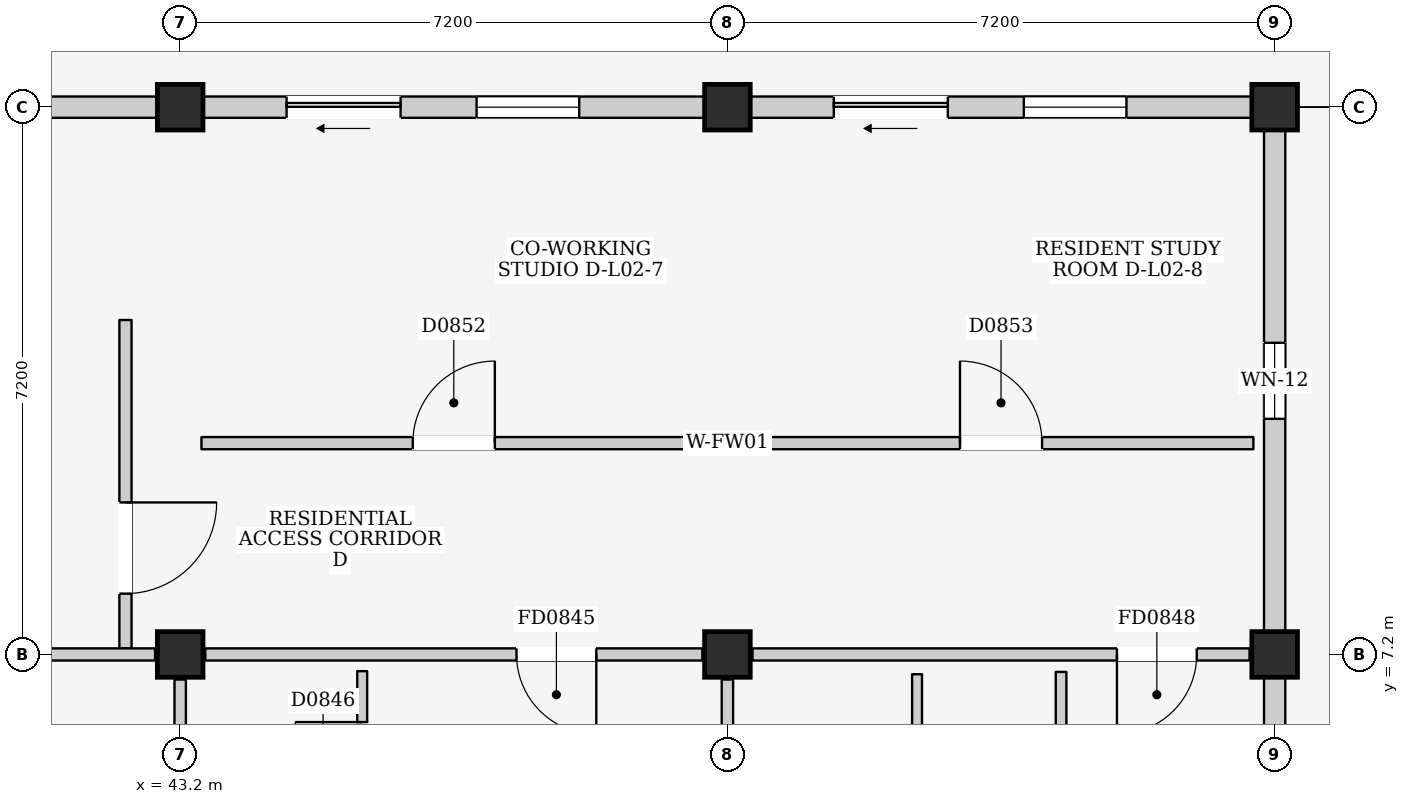
"""IFC4 building model, lengths in metres.
Left out: names, types, materials, properties, quantities, classifications, styles, units other than length and angle.
Written with IfcOpenShell. Run it as: python <this file> out.ifc"""

import sys

from ifc_helpers import new_model, si_unit, direction, frame, frame_2d, origin, origin_2d, place, context, subcontext, project, spatial, rectangle, extrude, element, fill, save


model = new_model("IFC4")
c1 = context("Model", 3, precision=1e-05, world=origin(), true_north=direction((0.0, 1.0)))
c2 = subcontext(c1, "Body", "Model", "MODEL_VIEW")
j1 = project(units=[si_unit("LENGTHUNIT", "METRE"), si_unit("PLANEANGLEUNIT", "RADIAN")], contexts=[c1])
p1 = place(None, origin())
s1 = spatial("IfcSite", under=j1, at=p1, CompositionType="ELEMENT")
p2 = place(p1, origin())
s2 = spatial("IfcBuilding", under=s1, at=p2, CompositionType="ELEMENT")
p3 = place(p2, frame((0.0, 0.0, 9.0)))
s3 = spatial("IfcBuildingStorey", under=s2, at=p3, CompositionType="ELEMENT", Elevation=9.0)
for number, where, z_axis, x_axis in (
    (1, (43.2, 7.2, 0.0), (0.0, 0.0, 1.0), (1.0, 0.0, 0.0)),
    (2, (43.2, 14.4, 0.0), (0.0, 0.0, 1.0), (1.0, 0.0, 0.0)),
    (3, (50.4, 7.2, 0.0), (0.0, 0.0, 1.0), (1.0, 0.0, 0.0)),
    (4, (50.4, 14.4, 0.0), (0.0, 0.0, 1.0), (1.0, 0.0, 0.0)),
    (5, (57.6, 7.2, 0.0), (0.0, 0.0, 1.0), (1.0, 0.0, 0.0)),
    (6, (57.6, 14.4, 0.0), (0.0, 0.0, 1.0), (1.0, 0.0, 0.0)),
):
    element("IfcColumn", number, at=place(p3, frame(where, z_axis=z_axis, x_axis=x_axis)), inside=s3, PredefinedType="COLUMN", context=c2, shape_type="SweptSolid", body=[
        extrude(rectangle(XDim=0.6, YDim=0.6, at=origin_2d()), origin(), (0.0, 0.0, 1.0), 3.2),
    ])
p4 = place(p3, frame((36.3, 14.4, 0.0), z_axis=(0.0, 0.0, 1.0), x_axis=(1.0, 0.0, 0.0)))
e7 = element("IfcWall", 7, at=p4, inside=s3, PredefinedType="ELEMENTEDWALL", context=c2, shape_type="SweptSolid", body=[
    extrude(rectangle(XDim=6.6, YDim=0.28, at=frame_2d((3.3, 0.0))), origin(), (0.0, 0.0, 1.0), 2.345),
])
p5 = place(p4, frame((2.8, 0.0, 1.2)))
e8 = element("IfcOpeningElement", 8, at=p5, cuts=e7, PredefinedType="OPENING", context=c2, shape_type="SweptSolid", body=[
    extrude(rectangle(XDim=1.0, YDim=0.9, at=frame_2d((0.5, 0.45))), frame((0.0, 0.155, 0.0), z_axis=(0.0, -1.0, 0.0), x_axis=(1.0, 0.0, 0.0)), (0.0, 0.0, 1.0), 0.31),
])
p6 = place(p3, frame((43.5, 14.4, 0.0), z_axis=(0.0, 0.0, 1.0), x_axis=(1.0, 0.0, 0.0)))
e9 = element("IfcWall", 9, at=p6, inside=s3, PredefinedType="ELEMENTEDWALL", context=c2, shape_type="SweptSolid", body=[
    extrude(rectangle(XDim=6.6, YDim=0.28, at=frame_2d((3.3, 0.0))), origin(), (0.0, 0.0, 1.0), 2.345),
])
p7 = place(p6, frame((1.1, 0.0, 0.0)))
e10 = element("IfcOpeningElement", 10, at=p7, cuts=e9, PredefinedType="OPENING", context=c2, shape_type="SweptSolid", body=[
    extrude(rectangle(XDim=1.5, YDim=2.12, at=frame_2d((0.75, 1.06))), frame((0.0, 0.155, 0.0), z_axis=(0.0, -1.0, 0.0), x_axis=(1.0, 0.0, 0.0)), (0.0, 0.0, 1.0), 0.31),
])
p8 = place(p6, frame((3.6, 0.0, 0.735)))
e11 = element("IfcOpeningElement", 11, at=p8, cuts=e9, PredefinedType="OPENING", context=c2, shape_type="SweptSolid", body=[
    extrude(rectangle(XDim=1.35, YDim=1.5, at=frame_2d((0.675, 0.75))), frame((0.0, 0.155, 0.0), z_axis=(0.0, -1.0, 0.0), x_axis=(1.0, 0.0, 0.0)), (0.0, 0.0, 1.0), 0.31),
])
p9 = place(p3, frame((57.6, 0.3, 0.0), z_axis=(0.0, 0.0, 1.0), x_axis=(0.0, 1.0, 0.0)))
e12 = element("IfcWall", 12, at=p9, inside=s3, PredefinedType="ELEMENTEDWALL", context=c2, shape_type="SweptSolid", body=[
    extrude(rectangle(XDim=6.6, YDim=0.28, at=frame_2d((3.3, 0.0))), origin(), (0.0, 0.0, 1.0), 2.395),
])
p10 = place(p9, frame((1.4, 0.0, 0.0)))
e13 = element("IfcOpeningElement", 13, at=p10, cuts=e12, PredefinedType="OPENING", context=c2, shape_type="SweptSolid", body=[
    extrude(rectangle(XDim=1.4, YDim=2.1, at=frame_2d((0.7, 1.05))), frame((0.0, 0.155, 0.0), z_axis=(0.0, -1.0, 0.0), x_axis=(1.0, 0.0, 0.0)), (0.0, 0.0, 1.0), 0.31),
])
p11 = place(p9, frame((4.4, 0.0, 0.935)))
e14 = element("IfcOpeningElement", 14, at=p11, cuts=e12, PredefinedType="OPENING", context=c2, shape_type="SweptSolid", body=[
    extrude(rectangle(XDim=1.2, YDim=1.35, at=frame_2d((0.6, 0.675))), frame((0.0, 0.155, 0.0), z_axis=(0.0, -1.0, 0.0), x_axis=(1.0, 0.0, 0.0)), (0.0, 0.0, 1.0), 0.31),
])
p12 = place(p3, frame((50.7, 14.4, 0.0), z_axis=(0.0, 0.0, 1.0), x_axis=(1.0, 0.0, 0.0)))
e15 = element("IfcWall", 15, at=p12, inside=s3, PredefinedType="ELEMENTEDWALL", context=c2, shape_type="SweptSolid", body=[
    extrude(rectangle(XDim=6.6, YDim=0.28, at=frame_2d((3.3, 0.0))), origin(), (0.0, 0.0, 1.0), 2.345),
])
p13 = place(p12, frame((1.1, 0.0, 0.0)))
e16 = element("IfcOpeningElement", 16, at=p13, cuts=e15, PredefinedType="OPENING", context=c2, shape_type="SweptSolid", body=[
    extrude(rectangle(XDim=1.5, YDim=2.12, at=frame_2d((0.75, 1.06))), frame((0.0, 0.155, 0.0), z_axis=(0.0, -1.0, 0.0), x_axis=(1.0, 0.0, 0.0)), (0.0, 0.0, 1.0), 0.31),
])
p14 = place(p12, frame((3.6, 0.0, 0.735)))
e17 = element("IfcOpeningElement", 17, at=p14, cuts=e15, PredefinedType="OPENING", context=c2, shape_type="SweptSolid", body=[
    extrude(rectangle(XDim=1.35, YDim=1.5, at=frame_2d((0.675, 0.75))), frame((0.0, 0.155, 0.0), z_axis=(0.0, -1.0, 0.0), x_axis=(1.0, 0.0, 0.0)), (0.0, 0.0, 1.0), 0.31),
])
p15 = place(p3, frame((57.6, 7.5, 0.0), z_axis=(0.0, 0.0, 1.0), x_axis=(0.0, 1.0, 0.0)))
e18 = element("IfcWall", 18, at=p15, inside=s3, PredefinedType="ELEMENTEDWALL", context=c2, shape_type="SweptSolid", body=[
    extrude(rectangle(XDim=6.6, YDim=0.28, at=frame_2d((3.3, 0.0))), origin(), (0.0, 0.0, 1.0), 2.395),
])
p16 = place(p15, frame((2.8, 0.0, 1.1)))
e19 = element("IfcOpeningElement", 19, at=p16, cuts=e18, PredefinedType="OPENING", context=c2, shape_type="SweptSolid", body=[
    extrude(rectangle(XDim=1.0, YDim=0.9, at=frame_2d((0.5, 0.45))), frame((0.0, 0.155, 0.0), z_axis=(0.0, -1.0, 0.0), x_axis=(1.0, 0.0, 0.0)), (0.0, 0.0, 1.0), 0.31),
])
p17 = place(p3, frame((42.48, 7.28, 0.0), z_axis=(0.0, 0.0, 1.0), x_axis=(0.0, 1.0, 0.0)))
e20 = element("IfcWall", 20, at=p17, inside=s3, PredefinedType="PARTITIONING", context=c2, shape_type="SweptSolid", body=[
    extrude(rectangle(XDim=4.32, YDim=0.16, at=frame_2d((2.16, 0.0))), origin(), (0.0, 0.0, 1.0), 2.96),
])
p18 = place(p17, frame((0.72, 0.0, 0.0)))
e21 = element("IfcOpeningElement", 21, at=p18, cuts=e20, PredefinedType="OPENING", context=c2, shape_type="SweptSolid", body=[
    extrude(rectangle(XDim=1.2, YDim=2.2, at=frame_2d((0.6, 1.1))), frame((0.0, 0.095, 0.0), z_axis=(0.0, -1.0, 0.0), x_axis=(1.0, 0.0, 0.0)), (0.0, 0.0, 1.0), 0.19),
])
p19 = place(p3, frame((36.33, 7.2, 0.0), z_axis=(0.0, 0.0, 1.0), x_axis=(1.0, 0.0, 0.0)))
e22 = element("IfcWall", 22, at=p19, inside=s3, PredefinedType="PARTITIONING", context=c2, shape_type="SweptSolid", body=[
    extrude(rectangle(XDim=6.54, YDim=0.16, at=frame_2d((3.27, 0.0))), origin(), (0.0, 0.0, 1.0), 2.345),
])
p20 = place(p3, frame((43.2, 0.33, 0.0), z_axis=(0.0, 0.0, 1.0), x_axis=(0.0, 1.0, 0.0)))
e23 = element("IfcWall", 23, at=p20, inside=s3, PredefinedType="PARTITIONING", context=c2, shape_type="SweptSolid", body=[
    extrude(rectangle(XDim=6.54, YDim=0.15, at=frame_2d((3.27, 0.0))), origin(), (0.0, 0.0, 1.0), 2.395),
])
p21 = place(p3, frame((43.53, 7.2, 0.0), z_axis=(0.0, 0.0, 1.0), x_axis=(1.0, 0.0, 0.0)))
e24 = element("IfcWall", 24, at=p21, inside=s3, PredefinedType="PARTITIONING", context=c2, shape_type="SweptSolid", body=[
    extrude(rectangle(XDim=6.54, YDim=0.16, at=frame_2d((3.27, 0.0))), origin(), (0.0, 0.0, 1.0), 2.345),
])
p22 = place(p21, frame((4.095, 0.0, 0.0)))
e25 = element("IfcOpeningElement", 25, at=p22, cuts=e24, PredefinedType="OPENING", context=c2, shape_type="SweptSolid", body=[
    extrude(rectangle(XDim=1.05, YDim=2.15, at=frame_2d((0.525, 1.075))), frame((0.0, 0.095, 0.0), z_axis=(0.0, -1.0, 0.0), x_axis=(1.0, 0.0, 0.0)), (0.0, 0.0, 1.0), 0.19),
])
p23 = place(p3, frame((50.4, 0.33, 0.0), z_axis=(0.0, 0.0, 1.0), x_axis=(0.0, 1.0, 0.0)))
e26 = element("IfcWall", 26, at=p23, inside=s3, PredefinedType="PARTITIONING", context=c2, shape_type="SweptSolid", body=[
    extrude(rectangle(XDim=6.54, YDim=0.15, at=frame_2d((3.27, 0.0))), origin(), (0.0, 0.0, 1.0), 2.395),
])
p24 = place(p3, frame((45.595, 4.76, 0.0), z_axis=(0.0, 0.0, 1.0), x_axis=(0.0, 1.0, 0.0)))
e27 = element("IfcWall", 27, at=p24, inside=s3, PredefinedType="PARTITIONING", context=c2, shape_type="SweptSolid", body=[
    extrude(rectangle(XDim=2.22, YDim=0.13, at=frame_2d((1.11, 0.0))), origin(), (0.0, 0.0, 1.0), 2.96),
])
p25 = place(p24, frame((0.67, 0.0, 0.0)))
e28 = element("IfcOpeningElement", 28, at=p25, cuts=e27, PredefinedType="OPENING", context=c2, shape_type="SweptSolid", body=[
    extrude(rectangle(XDim=0.88, YDim=2.1, at=frame_2d((0.44, 1.05))), frame((0.0, 0.08, 0.0), z_axis=(0.0, -1.0, 0.0), x_axis=(1.0, 0.0, 0.0)), (0.0, 0.0, 1.0), 0.16),
])
p26 = place(p3, frame((50.73, 7.2, 0.0), z_axis=(0.0, 0.0, 1.0), x_axis=(1.0, 0.0, 0.0)))
e29 = element("IfcWall", 29, at=p26, inside=s3, PredefinedType="PARTITIONING", context=c2, shape_type="SweptSolid", body=[
    extrude(rectangle(XDim=6.54, YDim=0.16, at=frame_2d((3.27, 0.0))), origin(), (0.0, 0.0, 1.0), 2.345),
])
p27 = place(p26, frame((4.795, 0.0, 0.0)))
e30 = element("IfcOpeningElement", 30, at=p27, cuts=e29, PredefinedType="OPENING", context=c2, shape_type="SweptSolid", body=[
    extrude(rectangle(XDim=1.05, YDim=2.15, at=frame_2d((0.525, 1.075))), frame((0.0, 0.095, 0.0), z_axis=(0.0, -1.0, 0.0), x_axis=(1.0, 0.0, 0.0)), (0.0, 0.0, 1.0), 0.19),
])
p28 = place(p3, frame((52.895, 4.61, 0.0), z_axis=(0.0, 0.0, 1.0), x_axis=(0.0, 1.0, 0.0)))
e31 = element("IfcWall", 31, at=p28, inside=s3, PredefinedType="PARTITIONING", context=c2, shape_type="SweptSolid", body=[
    extrude(rectangle(XDim=2.33, YDim=0.13, at=frame_2d((1.165, 0.0))), origin(), (0.0, 0.0, 1.0), 2.96),
])
p29 = place(p3, frame((54.79, 4.62, 0.0), z_axis=(0.0, 0.0, 1.0), x_axis=(0.0, 1.0, 0.0)))
e32 = element("IfcWall", 32, at=p29, inside=s3, PredefinedType="PARTITIONING", context=c2, shape_type="SweptSolid", body=[
    extrude(rectangle(XDim=2.35, YDim=0.14, at=frame_2d((1.175, 0.0))), origin(), (0.0, 0.0, 1.0), 2.96),
])
p30 = place(p3, frame((43.48, 9.98, 0.0), z_axis=(0.0, 0.0, 1.0), x_axis=(1.0, 0.0, 0.0)))
e33 = element("IfcWall", 33, at=p30, inside=s3, PredefinedType="PARTITIONING", context=c2, shape_type="SweptSolid", body=[
    extrude(rectangle(XDim=6.64, YDim=0.16, at=frame_2d((3.32, 0.0))), origin(), (0.0, 0.0, 1.0), 2.96),
])
p31 = place(p30, frame((2.78, 0.0, 0.0)))
e34 = element("IfcOpeningElement", 34, at=p31, cuts=e33, PredefinedType="OPENING", context=c2, shape_type="SweptSolid", body=[
    extrude(rectangle(XDim=1.08, YDim=2.22, at=frame_2d((0.54, 1.11))), frame((0.0, 0.095, 0.0), z_axis=(0.0, -1.0, 0.0), x_axis=(1.0, 0.0, 0.0)), (0.0, 0.0, 1.0), 0.19),
])
p32 = place(p3, frame((50.68, 9.98, 0.0), z_axis=(0.0, 0.0, 1.0), x_axis=(1.0, 0.0, 0.0)))
e35 = element("IfcWall", 35, at=p32, inside=s3, PredefinedType="PARTITIONING", context=c2, shape_type="SweptSolid", body=[
    extrude(rectangle(XDim=6.64, YDim=0.16, at=frame_2d((3.32, 0.0))), origin(), (0.0, 0.0, 1.0), 2.96),
])
p33 = place(p32, frame((2.78, 0.0, 0.0)))
e36 = element("IfcOpeningElement", 36, at=p33, cuts=e35, PredefinedType="OPENING", context=c2, shape_type="SweptSolid", body=[
    extrude(rectangle(XDim=1.08, YDim=2.22, at=frame_2d((0.54, 1.11))), frame((0.0, 0.095, 0.0), z_axis=(0.0, -1.0, 0.0), x_axis=(1.0, 0.0, 0.0)), (0.0, 0.0, 1.0), 0.19),
])
p34 = place(p7, frame((1.5, 0.0, 0.0), z_axis=(0.0, 0.0, 1.0), x_axis=(-1.0, 0.0, 0.0)))
e37 = element("IfcDoor", 37, at=p34, inside=s3, OperationType="SLIDING_TO_LEFT", PredefinedType="DOOR", context=c2, shape_type="SweptSolid", body=[
    extrude(rectangle(XDim=1.5, YDim=2.12, at=frame_2d((0.75, 1.06))), frame((0.0, 0.025, 0.0), z_axis=(0.0, -1.0, 0.0), x_axis=(1.0, 0.0, 0.0)), (0.0, 0.0, 1.0), 0.05),
])
fill(e10, e37)
p35 = place(p8, origin())
e38 = element("IfcWindow", 38, at=p35, inside=s3, PartitioningType="SINGLE_PANEL", PredefinedType="WINDOW", context=c2, shape_type="SweptSolid", body=[
    extrude(rectangle(XDim=1.35, YDim=1.5, at=frame_2d((0.675, 0.75))), frame((0.0, 0.03, 0.0), z_axis=(0.0, -1.0, 0.0), x_axis=(1.0, 0.0, 0.0)), (0.0, 0.0, 1.0), 0.06),
])
fill(e11, e38)
p36 = place(p13, frame((1.5, 0.0, 0.0), z_axis=(0.0, 0.0, 1.0), x_axis=(-1.0, 0.0, 0.0)))
e39 = element("IfcDoor", 39, at=p36, inside=s3, OperationType="SLIDING_TO_LEFT", PredefinedType="DOOR", context=c2, shape_type="SweptSolid", body=[
    extrude(rectangle(XDim=1.5, YDim=2.12, at=frame_2d((0.75, 1.06))), frame((0.0, 0.025, 0.0), z_axis=(0.0, -1.0, 0.0), x_axis=(1.0, 0.0, 0.0)), (0.0, 0.0, 1.0), 0.05),
])
fill(e16, e39)
p37 = place(p14, origin())
e40 = element("IfcWindow", 40, at=p37, inside=s3, PartitioningType="SINGLE_PANEL", PredefinedType="WINDOW", context=c2, shape_type="SweptSolid", body=[
    extrude(rectangle(XDim=1.35, YDim=1.5, at=frame_2d((0.675, 0.75))), frame((0.0, 0.03, 0.0), z_axis=(0.0, -1.0, 0.0), x_axis=(1.0, 0.0, 0.0)), (0.0, 0.0, 1.0), 0.06),
])
fill(e17, e40)
p38 = place(p16, origin())
e41 = element("IfcWindow", 41, at=p38, inside=s3, PartitioningType="SINGLE_PANEL", PredefinedType="WINDOW", context=c2, shape_type="SweptSolid", body=[
    extrude(rectangle(XDim=1.0, YDim=0.9, at=frame_2d((0.5, 0.45))), frame((0.0, 0.03, 0.0), z_axis=(0.0, -1.0, 0.0), x_axis=(1.0, 0.0, 0.0)), (0.0, 0.0, 1.0), 0.06),
])
fill(e19, e41)
p39 = place(p18, frame((1.2, 0.0, 0.0), z_axis=(0.0, 0.0, 1.0), x_axis=(-1.0, 0.0, 0.0)))
e42 = element("IfcDoor", 42, at=p39, inside=s3, OperationType="SINGLE_SWING_LEFT", PredefinedType="DOOR", context=c2, shape_type="SweptSolid", body=[
    extrude(rectangle(XDim=1.2, YDim=2.2, at=frame_2d((0.6, 1.1))), frame((0.0, 0.025, 0.0), z_axis=(0.0, -1.0, 0.0), x_axis=(1.0, 0.0, 0.0)), (0.0, 0.0, 1.0), 0.05),
])
fill(e21, e42)
p40 = place(p22, frame((1.05, 0.0, 0.0), z_axis=(0.0, 0.0, 1.0), x_axis=(-1.0, 0.0, 0.0)))
e43 = element("IfcDoor", 43, at=p40, inside=s3, OperationType="SINGLE_SWING_LEFT", PredefinedType="DOOR", context=c2, shape_type="SweptSolid", body=[
    extrude(rectangle(XDim=1.05, YDim=2.15, at=frame_2d((0.525, 1.075))), frame((0.0, 0.025, 0.0), z_axis=(0.0, -1.0, 0.0), x_axis=(1.0, 0.0, 0.0)), (0.0, 0.0, 1.0), 0.05),
])
fill(e25, e43)
p41 = place(p25, origin())
e44 = element("IfcDoor", 44, at=p41, inside=s3, OperationType="SINGLE_SWING_RIGHT", PredefinedType="DOOR", context=c2, shape_type="SweptSolid", body=[
    extrude(rectangle(XDim=0.88, YDim=2.1, at=frame_2d((0.44, 1.05))), frame((0.0, 0.025, 0.0), z_axis=(0.0, -1.0, 0.0), x_axis=(1.0, 0.0, 0.0)), (0.0, 0.0, 1.0), 0.05),
])
fill(e28, e44)
p42 = place(p27, frame((1.05, 0.0, 0.0), z_axis=(0.0, 0.0, 1.0), x_axis=(-1.0, 0.0, 0.0)))
e45 = element("IfcDoor", 45, at=p42, inside=s3, OperationType="SINGLE_SWING_RIGHT", PredefinedType="DOOR", context=c2, shape_type="SweptSolid", body=[
    extrude(rectangle(XDim=1.05, YDim=2.15, at=frame_2d((0.525, 1.075))), frame((0.0, 0.025, 0.0), z_axis=(0.0, -1.0, 0.0), x_axis=(1.0, 0.0, 0.0)), (0.0, 0.0, 1.0), 0.05),
])
fill(e30, e45)
p43 = place(p31, origin())
e46 = element("IfcDoor", 46, at=p43, inside=s3, OperationType="SINGLE_SWING_RIGHT", PredefinedType="DOOR", context=c2, shape_type="SweptSolid", body=[
    extrude(rectangle(XDim=1.08, YDim=2.22, at=frame_2d((0.54, 1.11))), frame((0.0, 0.025, 0.0), z_axis=(0.0, -1.0, 0.0), x_axis=(1.0, 0.0, 0.0)), (0.0, 0.0, 1.0), 0.05),
])
fill(e34, e46)
p44 = place(p33, origin())
e47 = element("IfcDoor", 47, at=p44, inside=s3, OperationType="SINGLE_SWING_LEFT", PredefinedType="DOOR", context=c2, shape_type="SweptSolid", body=[
    extrude(rectangle(XDim=1.08, YDim=2.22, at=frame_2d((0.54, 1.11))), frame((0.0, 0.025, 0.0), z_axis=(0.0, -1.0, 0.0), x_axis=(1.0, 0.0, 0.0)), (0.0, 0.0, 1.0), 0.05),
])
fill(e36, e47)
save(model, sys.argv[1])
